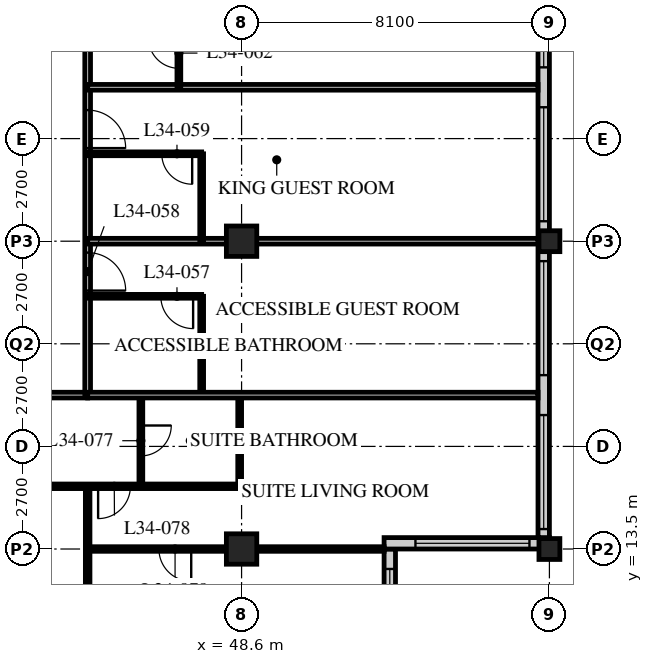
"""IFC4 building model, lengths in metres.
Left out: names, types, materials, properties, quantities, classifications, styles, units other than length and angle.
Written with IfcOpenShell. Run it as: python <this file> out.ifc"""

import sys

from ifc_helpers import new_model, si_unit, direction, frame, frame_2d, origin, origin_2d, place, context, subcontext, project, spatial, rectangle, hollow_rectangle, extrude, element, fill, save


model = new_model("IFC4")
c1 = context("Model", 3, precision=1e-05, world=origin(), true_north=direction((0.0, 1.0)))
c2 = subcontext(c1, "Body", "Model", "MODEL_VIEW")
j1 = project(units=[si_unit("LENGTHUNIT", "METRE"), si_unit("PLANEANGLEUNIT", "RADIAN")], contexts=[c1])
p1 = place(None, origin())
s1 = spatial("IfcSite", under=j1, at=p1, CompositionType="ELEMENT")
p2 = place(p1, origin())
s2 = spatial("IfcBuilding", under=s1, at=p2, CompositionType="ELEMENT")
p3 = place(p2, frame((0.0, 0.0, 134.0)))
s3 = spatial("IfcBuildingStorey", under=s2, at=p3, CompositionType="ELEMENT", Elevation=134.0)
for number, where, z_axis, x_axis in (
    (1, (48.6, 13.5, 0.0), (0.0, 0.0, 1.0), (1.0, 0.0, 0.0)),
    (2, (48.6, 21.6, 0.0), (0.0, 0.0, 1.0), (1.0, 0.0, 0.0)),
):
    element("IfcColumn", number, at=place(p3, frame(where, z_axis=z_axis, x_axis=x_axis)), inside=s3, PredefinedType="COLUMN", context=c2, shape_type="SweptSolid", body=[
        extrude(hollow_rectangle(XDim=0.8, YDim=0.8, WallThickness=0.08, at=origin_2d()), origin(), (0.0, 0.0, 1.0), 3.4),
    ])
for number, where, z_axis, x_axis in (
    (3, (56.7, 13.5, 0.0), (0.0, 0.0, 1.0), (1.0, 0.0, 0.0)),
    (4, (56.7, 21.6, 0.0), (0.0, 0.0, 1.0), (1.0, 0.0, 0.0)),
):
    element("IfcColumn", number, at=place(p3, frame(where, z_axis=z_axis, x_axis=x_axis)), inside=s3, PredefinedType="COLUMN", context=c2, shape_type="SweptSolid", body=[
        extrude(hollow_rectangle(XDim=0.55, YDim=0.55, WallThickness=0.04, at=origin_2d()), origin(), (0.0, 0.0, 1.0), 3.4),
    ])
p4 = place(p3, frame((52.5, 9.75, 0.0), z_axis=(0.0, 0.0, 1.0), x_axis=(0.0, 1.0, 0.0)))
e5 = element("IfcWall", 5, at=p4, inside=s3, PredefinedType="SOLIDWALL", context=c2, shape_type="SweptSolid", body=[
    extrude(rectangle(XDim=3.75, YDim=0.3, at=frame_2d((1.875, 0.0))), origin(), (0.0, 0.0, 1.0), 3.19),
])
p5 = place(p4, frame((0.225, 0.0, 0.9)))
e6 = element("IfcOpeningElement", 6, at=p5, cuts=e5, PredefinedType="OPENING", context=c2, shape_type="SweptSolid", body=[
    extrude(rectangle(XDim=3.0, YDim=1.5, at=frame_2d((1.5, 0.75))), frame((0.0, 0.16, 0.0), z_axis=(0.0, -1.0, 0.0), x_axis=(1.0, 0.0, 0.0)), (0.0, 0.0, 1.0), 0.32),
])
p6 = place(p3, frame((52.35, 13.65, 0.0), z_axis=(0.0, 0.0, 1.0), x_axis=(1.0, 0.0, 0.0)))
e7 = element("IfcWall", 7, at=p6, inside=s3, PredefinedType="SOLIDWALL", context=c2, shape_type="SweptSolid", body=[
    extrude(rectangle(XDim=4.35, YDim=0.3, at=frame_2d((2.175, 0.0))), origin(), (0.0, 0.0, 1.0), 3.19),
])
p7 = place(p6, frame((0.825, 0.0, 0.9)))
e8 = element("IfcOpeningElement", 8, at=p7, cuts=e7, PredefinedType="OPENING", context=c2, shape_type="SweptSolid", body=[
    extrude(rectangle(XDim=3.0, YDim=1.5, at=frame_2d((1.5, 0.75))), frame((0.0, 0.16, 0.0), z_axis=(0.0, -1.0, 0.0), x_axis=(1.0, 0.0, 0.0)), (0.0, 0.0, 1.0), 0.32),
])
p8 = place(p3, frame((56.55, 13.8, 0.0), z_axis=(0.0, 0.0, 1.0), x_axis=(0.0, 1.0, 0.0)))
e9 = element("IfcWall", 9, at=p8, inside=s3, PredefinedType="SOLIDWALL", context=c2, shape_type="SweptSolid", body=[
    extrude(rectangle(XDim=32.1, YDim=0.3, at=frame_2d((16.05, 0.0))), origin(), (0.0, 0.0, 1.0), 3.19),
])
p9 = place(p8, frame((0.225, 0.0, 0.9)))
e10 = element("IfcOpeningElement", 10, at=p9, cuts=e9, PredefinedType="OPENING", context=c2, shape_type="SweptSolid", body=[
    extrude(rectangle(XDim=3.0, YDim=2.0, at=frame_2d((1.5, 1.0))), frame((0.0, 0.16, 0.0), z_axis=(0.0, -1.0, 0.0), x_axis=(1.0, 0.0, 0.0)), (0.0, 0.0, 1.0), 0.32),
])
p10 = place(p8, frame((4.275, 0.0, 0.9)))
e11 = element("IfcOpeningElement", 11, at=p10, cuts=e9, PredefinedType="OPENING", context=c2, shape_type="SweptSolid", body=[
    extrude(rectangle(XDim=3.0, YDim=2.0, at=frame_2d((1.5, 1.0))), frame((0.0, 0.16, 0.0), z_axis=(0.0, -1.0, 0.0), x_axis=(1.0, 0.0, 0.0)), (0.0, 0.0, 1.0), 0.32),
])
p11 = place(p8, frame((8.325, 0.0, 0.9)))
e12 = element("IfcOpeningElement", 12, at=p11, cuts=e9, PredefinedType="OPENING", context=c2, shape_type="SweptSolid", body=[
    extrude(rectangle(XDim=3.0, YDim=2.0, at=frame_2d((1.5, 1.0))), frame((0.0, 0.16, 0.0), z_axis=(0.0, -1.0, 0.0), x_axis=(1.0, 0.0, 0.0)), (0.0, 0.0, 1.0), 0.32),
])
p12 = place(p8, frame((12.375, 0.0, 0.9)))
e13 = element("IfcOpeningElement", 13, at=p12, cuts=e9, PredefinedType="OPENING", context=c2, shape_type="SweptSolid", body=[
    extrude(rectangle(XDim=3.0, YDim=2.0, at=frame_2d((1.5, 1.0))), frame((0.0, 0.16, 0.0), z_axis=(0.0, -1.0, 0.0), x_axis=(1.0, 0.0, 0.0)), (0.0, 0.0, 1.0), 0.32),
])
p13 = place(p8, frame((16.425, 0.0, 0.9)))
e14 = element("IfcOpeningElement", 14, at=p13, cuts=e9, PredefinedType="OPENING", context=c2, shape_type="SweptSolid", body=[
    extrude(rectangle(XDim=3.0, YDim=2.0, at=frame_2d((1.5, 1.0))), frame((0.0, 0.16, 0.0), z_axis=(0.0, -1.0, 0.0), x_axis=(1.0, 0.0, 0.0)), (0.0, 0.0, 1.0), 0.32),
])
p14 = place(p8, frame((20.475, 0.0, 0.9)))
e15 = element("IfcOpeningElement", 15, at=p14, cuts=e9, PredefinedType="OPENING", context=c2, shape_type="SweptSolid", body=[
    extrude(rectangle(XDim=3.0, YDim=2.0, at=frame_2d((1.5, 1.0))), frame((0.0, 0.16, 0.0), z_axis=(0.0, -1.0, 0.0), x_axis=(1.0, 0.0, 0.0)), (0.0, 0.0, 1.0), 0.32),
])
p15 = place(p8, frame((24.525, 0.0, 0.9)))
e16 = element("IfcOpeningElement", 16, at=p15, cuts=e9, PredefinedType="OPENING", context=c2, shape_type="SweptSolid", body=[
    extrude(rectangle(XDim=3.0, YDim=2.0, at=frame_2d((1.5, 1.0))), frame((0.0, 0.16, 0.0), z_axis=(0.0, -1.0, 0.0), x_axis=(1.0, 0.0, 0.0)), (0.0, 0.0, 1.0), 0.32),
])
p16 = place(p8, frame((28.575, 0.0, 0.9)))
e17 = element("IfcOpeningElement", 17, at=p16, cuts=e9, PredefinedType="OPENING", context=c2, shape_type="SweptSolid", body=[
    extrude(rectangle(XDim=3.0, YDim=2.0, at=frame_2d((1.5, 1.0))), frame((0.0, 0.16, 0.0), z_axis=(0.0, -1.0, 0.0), x_axis=(1.0, 0.0, 0.0)), (0.0, 0.0, 1.0), 0.32),
])
p17 = place(p3, frame((8.1, 17.55, 0.0), z_axis=(0.0, 0.0, 1.0), x_axis=(1.0, 0.0, 0.0)))
e18 = element("IfcWall", 18, at=p17, inside=s3, PredefinedType="PARTITIONING", context=c2, shape_type="SweptSolid", body=[
    extrude(rectangle(XDim=36.45, YDim=0.15, at=frame_2d((18.225, 0.0))), origin(), (0.0, 0.0, 1.0), 3.19),
])
p18 = place(p17, frame((9.625, 0.0, 0.0)))
e19 = element("IfcOpeningElement", 19, at=p18, cuts=e18, PredefinedType="OPENING", context=c2, shape_type="SweptSolid", body=[
    extrude(rectangle(XDim=1.0, YDim=2.1, at=frame_2d((0.5, 1.05))), frame((0.0, 0.085, 0.0), z_axis=(0.0, -1.0, 0.0), x_axis=(1.0, 0.0, 0.0)), (0.0, 0.0, 1.0), 0.17),
])
p19 = place(p17, frame((18.1, 0.0, 0.0)))
e20 = element("IfcOpeningElement", 20, at=p19, cuts=e18, PredefinedType="OPENING", context=c2, shape_type="SweptSolid", body=[
    extrude(rectangle(XDim=1.0, YDim=2.1, at=frame_2d((0.5, 1.05))), frame((0.0, 0.085, 0.0), z_axis=(0.0, -1.0, 0.0), x_axis=(1.0, 0.0, 0.0)), (0.0, 0.0, 1.0), 0.17),
])
p20 = place(p17, frame((26.75, 0.0, 0.0)))
e21 = element("IfcOpeningElement", 21, at=p20, cuts=e18, PredefinedType="OPENING", context=c2, shape_type="SweptSolid", body=[
    extrude(rectangle(XDim=1.0, YDim=2.1, at=frame_2d((0.5, 1.05))), frame((0.0, 0.085, 0.0), z_axis=(0.0, -1.0, 0.0), x_axis=(1.0, 0.0, 0.0)), (0.0, 0.0, 1.0), 0.17),
])
p21 = place(p17, frame((30.8, 0.0, 0.0)))
e22 = element("IfcOpeningElement", 22, at=p21, cuts=e18, PredefinedType="OPENING", context=c2, shape_type="SweptSolid", body=[
    extrude(rectangle(XDim=1.0, YDim=2.1, at=frame_2d((0.5, 1.05))), frame((0.0, 0.085, 0.0), z_axis=(0.0, -1.0, 0.0), x_axis=(1.0, 0.0, 0.0)), (0.0, 0.0, 1.0), 0.17),
])
p22 = place(p17, frame((1.525, 0.0, 0.0)))
e23 = element("IfcOpeningElement", 23, at=p22, cuts=e18, PredefinedType="OPENING", context=c2, shape_type="SweptSolid", body=[
    extrude(rectangle(XDim=1.0, YDim=2.1, at=frame_2d((0.5, 1.05))), frame((0.0, 0.085, 0.0), z_axis=(0.0, -1.0, 0.0), x_axis=(1.0, 0.0, 0.0)), (0.0, 0.0, 1.0), 0.17),
])
p23 = place(p17, frame((33.925, 0.0, 0.0)))
e24 = element("IfcOpeningElement", 24, at=p23, cuts=e18, PredefinedType="OPENING", context=c2, shape_type="SweptSolid", body=[
    extrude(rectangle(XDim=1.0, YDim=2.1, at=frame_2d((0.5, 1.05))), frame((0.0, 0.085, 0.0), z_axis=(0.0, -1.0, 0.0), x_axis=(1.0, 0.0, 0.0)), (0.0, 0.0, 1.0), 0.17),
])
p24 = place(p3, frame((44.55, 17.55, 0.0), z_axis=(0.0, 0.0, 1.0), x_axis=(0.0, 1.0, 0.0)))
e25 = element("IfcWall", 25, at=p24, inside=s3, PredefinedType="PARTITIONING", context=c2, shape_type="SweptSolid", body=[
    extrude(rectangle(XDim=28.35, YDim=0.15, at=frame_2d((14.175, 0.0))), origin(), (0.0, 0.0, 1.0), 3.19),
])
p25 = place(p24, frame((2.75, 0.0, 0.0)))
e26 = element("IfcOpeningElement", 26, at=p25, cuts=e25, PredefinedType="OPENING", context=c2, shape_type="SweptSolid", body=[
    extrude(rectangle(XDim=1.0, YDim=2.1, at=frame_2d((0.5, 1.05))), frame((0.0, 0.085, 0.0), z_axis=(0.0, -1.0, 0.0), x_axis=(1.0, 0.0, 0.0)), (0.0, 0.0, 1.0), 0.17),
])
p26 = place(p24, frame((6.5, 0.0, 0.0)))
e27 = element("IfcOpeningElement", 27, at=p26, cuts=e25, PredefinedType="OPENING", context=c2, shape_type="SweptSolid", body=[
    extrude(rectangle(XDim=1.0, YDim=2.1, at=frame_2d((0.5, 1.05))), frame((0.0, 0.085, 0.0), z_axis=(0.0, -1.0, 0.0), x_axis=(1.0, 0.0, 0.0)), (0.0, 0.0, 1.0), 0.17),
])
p27 = place(p24, frame((13.55, 0.0, 0.0)))
e28 = element("IfcOpeningElement", 28, at=p27, cuts=e25, PredefinedType="OPENING", context=c2, shape_type="SweptSolid", body=[
    extrude(rectangle(XDim=1.0, YDim=2.1, at=frame_2d((0.5, 1.05))), frame((0.0, 0.085, 0.0), z_axis=(0.0, -1.0, 0.0), x_axis=(1.0, 0.0, 0.0)), (0.0, 0.0, 1.0), 0.17),
])
p28 = place(p24, frame((18.1, 0.0, 0.0)))
e29 = element("IfcOpeningElement", 29, at=p28, cuts=e25, PredefinedType="OPENING", context=c2, shape_type="SweptSolid", body=[
    extrude(rectangle(XDim=1.0, YDim=2.1, at=frame_2d((0.5, 1.05))), frame((0.0, 0.085, 0.0), z_axis=(0.0, -1.0, 0.0), x_axis=(1.0, 0.0, 0.0)), (0.0, 0.0, 1.0), 0.17),
])
p29 = place(p24, frame((26.75, 0.0, 0.0)))
e30 = element("IfcOpeningElement", 30, at=p29, cuts=e25, PredefinedType="OPENING", context=c2, shape_type="SweptSolid", body=[
    extrude(rectangle(XDim=1.0, YDim=2.1, at=frame_2d((0.5, 1.05))), frame((0.0, 0.085, 0.0), z_axis=(0.0, -1.0, 0.0), x_axis=(1.0, 0.0, 0.0)), (0.0, 0.0, 1.0), 0.17),
])
p30 = place(p3, frame((47.55, 17.55, 0.0), z_axis=(0.0, 0.0, 1.0), x_axis=(0.0, 1.0, 0.0)))
e31 = element("IfcWall", 31, at=p30, inside=s3, PredefinedType="PARTITIONING", context=c2, shape_type="SweptSolid", body=[
    extrude(rectangle(XDim=2.6, YDim=0.1, at=frame_2d((1.3, 0.0))), origin(), (0.0, 0.0, 1.0), 3.19),
])
p31 = place(p3, frame((44.55, 20.15, 0.0), z_axis=(0.0, 0.0, 1.0), x_axis=(1.0, 0.0, 0.0)))
e32 = element("IfcWall", 32, at=p31, inside=s3, PredefinedType="PARTITIONING", context=c2, shape_type="SweptSolid", body=[
    extrude(rectangle(XDim=3.0, YDim=0.1, at=frame_2d((1.5, 0.0))), origin(), (0.0, 0.0, 1.0), 3.19),
])
p32 = place(p31, frame((1.925, 0.0, 0.0)))
e33 = element("IfcOpeningElement", 33, at=p32, cuts=e32, PredefinedType="OPENING", context=c2, shape_type="SweptSolid", body=[
    extrude(rectangle(XDim=0.85, YDim=2.1, at=frame_2d((0.425, 1.05))), frame((0.0, 0.06, 0.0), z_axis=(0.0, -1.0, 0.0), x_axis=(1.0, 0.0, 0.0)), (0.0, 0.0, 1.0), 0.12),
])
p33 = place(p3, frame((44.55, 21.6, 0.0), z_axis=(0.0, 0.0, 1.0), x_axis=(1.0, 0.0, 0.0)))
e34 = element("IfcWall", 34, at=p33, inside=s3, PredefinedType="PARTITIONING", context=c2, shape_type="SweptSolid", body=[
    extrude(rectangle(XDim=11.85, YDim=0.15, at=frame_2d((5.925, 0.0))), origin(), (0.0, 0.0, 1.0), 2.578),
])
p34 = place(p3, frame((47.55, 21.6, 0.0), z_axis=(0.0, 0.0, 1.0), x_axis=(0.0, 1.0, 0.0)))
e35 = element("IfcWall", 35, at=p34, inside=s3, PredefinedType="PARTITIONING", context=c2, shape_type="SweptSolid", body=[
    extrude(rectangle(XDim=2.3, YDim=0.1, at=frame_2d((1.15, 0.0))), origin(), (0.0, 0.0, 1.0), 3.19),
])
p35 = place(p3, frame((44.55, 23.9, 0.0), z_axis=(0.0, 0.0, 1.0), x_axis=(1.0, 0.0, 0.0)))
e36 = element("IfcWall", 36, at=p35, inside=s3, PredefinedType="PARTITIONING", context=c2, shape_type="SweptSolid", body=[
    extrude(rectangle(XDim=3.0, YDim=0.1, at=frame_2d((1.5, 0.0))), origin(), (0.0, 0.0, 1.0), 3.19),
])
p36 = place(p35, frame((1.95, 0.0, 0.0)))
e37 = element("IfcOpeningElement", 37, at=p36, cuts=e36, PredefinedType="OPENING", context=c2, shape_type="SweptSolid", body=[
    extrude(rectangle(XDim=0.8, YDim=2.1, at=frame_2d((0.4, 1.05))), frame((0.0, 0.06, 0.0), z_axis=(0.0, -1.0, 0.0), x_axis=(1.0, 0.0, 0.0)), (0.0, 0.0, 1.0), 0.12),
])
p37 = place(p3, frame((44.55, 25.65, 0.0), z_axis=(0.0, 0.0, 1.0), x_axis=(1.0, 0.0, 0.0)))
e38 = element("IfcWall", 38, at=p37, inside=s3, PredefinedType="PARTITIONING", context=c2, shape_type="SweptSolid", body=[
    extrude(rectangle(XDim=11.85, YDim=0.15, at=frame_2d((5.925, 0.0))), origin(), (0.0, 0.0, 1.0), 3.19),
])
p38 = place(p3, frame((46.95, 25.65, 0.0), z_axis=(0.0, 0.0, 1.0), x_axis=(0.0, 1.0, 0.0)))
e39 = element("IfcWall", 39, at=p38, inside=s3, PredefinedType="PARTITIONING", context=c2, shape_type="SweptSolid", body=[
    extrude(rectangle(XDim=1.8, YDim=0.1, at=frame_2d((0.9, 0.0))), origin(), (0.0, 0.0, 1.0), 3.19),
])
p39 = place(p38, frame((0.5, 0.0, 0.0)))
e40 = element("IfcOpeningElement", 40, at=p39, cuts=e39, PredefinedType="OPENING", context=c2, shape_type="SweptSolid", body=[
    extrude(rectangle(XDim=0.8, YDim=2.1, at=frame_2d((0.4, 1.05))), frame((0.0, 0.06, 0.0), z_axis=(0.0, -1.0, 0.0), x_axis=(1.0, 0.0, 0.0)), (0.0, 0.0, 1.0), 0.12),
])
p40 = place(p3, frame((40.5, 15.15, 0.0), z_axis=(0.0, 0.0, 1.0), x_axis=(1.0, 0.0, 0.0)))
e41 = element("IfcWall", 41, at=p40, inside=s3, PredefinedType="PARTITIONING", context=c2, shape_type="SweptSolid", body=[
    extrude(rectangle(XDim=8.05, YDim=0.12, at=frame_2d((4.025, 0.0))), origin(), (0.0, 0.0, 1.0), 3.19),
])
p41 = place(p40, frame((0.475, 0.0, 0.0)))
e42 = element("IfcOpeningElement", 42, at=p41, cuts=e41, PredefinedType="OPENING", context=c2, shape_type="SweptSolid", body=[
    extrude(rectangle(XDim=0.85, YDim=2.1, at=frame_2d((0.425, 1.05))), frame((0.0, 0.07, 0.0), z_axis=(0.0, -1.0, 0.0), x_axis=(1.0, 0.0, 0.0)), (0.0, 0.0, 1.0), 0.14),
])
p42 = place(p40, frame((4.325, 0.0, 0.0)))
e43 = element("IfcOpeningElement", 43, at=p42, cuts=e41, PredefinedType="OPENING", context=c2, shape_type="SweptSolid", body=[
    extrude(rectangle(XDim=0.85, YDim=2.1, at=frame_2d((0.425, 1.05))), frame((0.0, 0.07, 0.0), z_axis=(0.0, -1.0, 0.0), x_axis=(1.0, 0.0, 0.0)), (0.0, 0.0, 1.0), 0.14),
])
p43 = place(p3, frame((45.95, 17.55, 0.0), z_axis=(0.0, 0.0, 1.0), x_axis=(0.0, -1.0, 0.0)))
e44 = element("IfcWall", 44, at=p43, inside=s3, PredefinedType="PARTITIONING", context=c2, shape_type="SweptSolid", body=[
    extrude(rectangle(XDim=2.4, YDim=0.1, at=frame_2d((1.2, 0.0))), origin(), (0.0, 0.0, 1.0), 3.19),
])
p44 = place(p43, frame((0.8, 0.0, 0.0)))
e45 = element("IfcOpeningElement", 45, at=p44, cuts=e44, PredefinedType="OPENING", context=c2, shape_type="SweptSolid", body=[
    extrude(rectangle(XDim=0.8, YDim=2.1, at=frame_2d((0.4, 1.05))), frame((0.0, 0.06, 0.0), z_axis=(0.0, -1.0, 0.0), x_axis=(1.0, 0.0, 0.0)), (0.0, 0.0, 1.0), 0.12),
])
p45 = place(p3, frame((48.55, 17.55, 0.0), z_axis=(0.0, 0.0, 1.0), x_axis=(0.0, -1.0, 0.0)))
e46 = element("IfcWall", 46, at=p45, inside=s3, PredefinedType="PARTITIONING", context=c2, shape_type="SweptSolid", body=[
    extrude(rectangle(XDim=2.4, YDim=0.1, at=frame_2d((1.2, 0.0))), origin(), (0.0, 0.0, 1.0), 2.578),
])
p46 = place(p3, frame((44.55, 15.15, 0.0), z_axis=(0.0, 0.0, 1.0), x_axis=(0.0, -1.0, 0.0)))
e47 = element("IfcWall", 47, at=p46, inside=s3, PredefinedType="PARTITIONING", context=c2, shape_type="SweptSolid", body=[
    extrude(rectangle(XDim=9.45, YDim=0.12, at=frame_2d((4.725, 0.0))), origin(), (0.0, 0.0, 1.0), 3.19),
])
p47 = place(p3, frame((44.55, 13.5, 0.0), z_axis=(0.0, 0.0, 1.0), x_axis=(1.0, 0.0, 0.0)))
e48 = element("IfcWall", 48, at=p47, inside=s3, PredefinedType="PARTITIONING", context=c2, shape_type="SweptSolid", body=[
    extrude(rectangle(XDim=7.8, YDim=0.12, at=frame_2d((3.9, 0.0))), origin(), (0.0, 0.0, 1.0), 2.578),
])
p48 = place(p47, frame((1.875, 0.0, 0.0)))
e49 = element("IfcOpeningElement", 49, at=p48, cuts=e48, PredefinedType="OPENING", context=c2, shape_type="SweptSolid", body=[
    extrude(rectangle(XDim=0.85, YDim=2.1, at=frame_2d((0.425, 1.05))), frame((0.0, 0.07, 0.0), z_axis=(0.0, -1.0, 0.0), x_axis=(1.0, 0.0, 0.0)), (0.0, 0.0, 1.0), 0.14),
])
p49 = place(p3, frame((44.55, 17.55, 0.0), z_axis=(0.0, 0.0, 1.0), x_axis=(1.0, 0.0, 0.0)))
e50 = element("IfcWall", 50, at=p49, inside=s3, PredefinedType="PARTITIONING", context=c2, shape_type="SweptSolid", body=[
    extrude(rectangle(XDim=11.85, YDim=0.15, at=frame_2d((5.925, 0.0))), origin(), (0.0, 0.0, 1.0), 3.19),
])
p50 = place(p5, origin())
e51 = element("IfcWindow", 51, at=p50, inside=s3, PartitioningType="SINGLE_PANEL", PredefinedType="WINDOW", context=c2, shape_type="SweptSolid", body=[
    extrude(rectangle(XDim=3.0, YDim=1.5, at=frame_2d((1.5, 0.75))), frame((0.0, 0.03, 0.0), z_axis=(0.0, -1.0, 0.0), x_axis=(1.0, 0.0, 0.0)), (0.0, 0.0, 1.0), 0.06),
])
fill(e6, e51)
p51 = place(p7, origin())
e52 = element("IfcWindow", 52, at=p51, inside=s3, PartitioningType="SINGLE_PANEL", PredefinedType="WINDOW", context=c2, shape_type="SweptSolid", body=[
    extrude(rectangle(XDim=3.0, YDim=1.5, at=frame_2d((1.5, 0.75))), frame((0.0, 0.03, 0.0), z_axis=(0.0, -1.0, 0.0), x_axis=(1.0, 0.0, 0.0)), (0.0, 0.0, 1.0), 0.06),
])
fill(e8, e52)
p52 = place(p9, origin())
e53 = element("IfcWindow", 53, at=p52, inside=s3, PartitioningType="SINGLE_PANEL", PredefinedType="WINDOW", context=c2, shape_type="SweptSolid", body=[
    extrude(rectangle(XDim=3.0, YDim=2.0, at=frame_2d((1.5, 1.0))), frame((0.0, 0.03, 0.0), z_axis=(0.0, -1.0, 0.0), x_axis=(1.0, 0.0, 0.0)), (0.0, 0.0, 1.0), 0.06),
])
fill(e10, e53)
p53 = place(p10, origin())
e54 = element("IfcWindow", 54, at=p53, inside=s3, PartitioningType="SINGLE_PANEL", PredefinedType="WINDOW", context=c2, shape_type="SweptSolid", body=[
    extrude(rectangle(XDim=3.0, YDim=2.0, at=frame_2d((1.5, 1.0))), frame((0.0, 0.03, 0.0), z_axis=(0.0, -1.0, 0.0), x_axis=(1.0, 0.0, 0.0)), (0.0, 0.0, 1.0), 0.06),
])
fill(e11, e54)
p54 = place(p11, origin())
e55 = element("IfcWindow", 55, at=p54, inside=s3, PartitioningType="SINGLE_PANEL", PredefinedType="WINDOW", context=c2, shape_type="SweptSolid", body=[
    extrude(rectangle(XDim=3.0, YDim=2.0, at=frame_2d((1.5, 1.0))), frame((0.0, 0.03, 0.0), z_axis=(0.0, -1.0, 0.0), x_axis=(1.0, 0.0, 0.0)), (0.0, 0.0, 1.0), 0.06),
])
fill(e12, e55)
p55 = place(p12, origin())
e56 = element("IfcWindow", 56, at=p55, inside=s3, PartitioningType="SINGLE_PANEL", PredefinedType="WINDOW", context=c2, shape_type="SweptSolid", body=[
    extrude(rectangle(XDim=3.0, YDim=2.0, at=frame_2d((1.5, 1.0))), frame((0.0, 0.03, 0.0), z_axis=(0.0, -1.0, 0.0), x_axis=(1.0, 0.0, 0.0)), (0.0, 0.0, 1.0), 0.06),
])
fill(e13, e56)
p56 = place(p32, origin())
e57 = element("IfcDoor", 57, at=p56, inside=s3, OperationType="SINGLE_SWING_LEFT", PredefinedType="DOOR", context=c2, shape_type="SweptSolid", body=[
    extrude(rectangle(XDim=0.85, YDim=2.1, at=frame_2d((0.425, 1.05))), frame((0.0, 0.025, 0.0), z_axis=(0.0, -1.0, 0.0), x_axis=(1.0, 0.0, 0.0)), (0.0, 0.0, 1.0), 0.05),
])
fill(e33, e57)
p57 = place(p25, origin())
e58 = element("IfcDoor", 58, at=p57, inside=s3, OperationType="SINGLE_SWING_RIGHT", PredefinedType="DOOR", context=c2, shape_type="SweptSolid", body=[
    extrude(rectangle(XDim=1.0, YDim=2.1, at=frame_2d((0.5, 1.05))), frame((0.0, 0.025, 0.0), z_axis=(0.0, -1.0, 0.0), x_axis=(1.0, 0.0, 0.0)), (0.0, 0.0, 1.0), 0.05),
])
fill(e26, e58)
p58 = place(p36, origin())
e59 = element("IfcDoor", 59, at=p58, inside=s3, OperationType="SINGLE_SWING_LEFT", PredefinedType="DOOR", context=c2, shape_type="SweptSolid", body=[
    extrude(rectangle(XDim=0.8, YDim=2.1, at=frame_2d((0.4, 1.05))), frame((0.0, 0.025, 0.0), z_axis=(0.0, -1.0, 0.0), x_axis=(1.0, 0.0, 0.0)), (0.0, 0.0, 1.0), 0.05),
])
fill(e37, e59)
p59 = place(p26, origin())
e60 = element("IfcDoor", 60, at=p59, inside=s3, OperationType="SINGLE_SWING_RIGHT", PredefinedType="DOOR", context=c2, shape_type="SweptSolid", body=[
    extrude(rectangle(XDim=1.0, YDim=2.1, at=frame_2d((0.5, 1.05))), frame((0.0, 0.025, 0.0), z_axis=(0.0, -1.0, 0.0), x_axis=(1.0, 0.0, 0.0)), (0.0, 0.0, 1.0), 0.05),
])
fill(e27, e60)
p60 = place(p39, origin())
e61 = element("IfcDoor", 61, at=p60, inside=s3, OperationType="SINGLE_SWING_RIGHT", PredefinedType="DOOR", context=c2, shape_type="SweptSolid", body=[
    extrude(rectangle(XDim=0.8, YDim=2.1, at=frame_2d((0.4, 1.05))), frame((0.0, 0.025, 0.0), z_axis=(0.0, -1.0, 0.0), x_axis=(1.0, 0.0, 0.0)), (0.0, 0.0, 1.0), 0.05),
])
fill(e40, e61)
p61 = place(p44, origin())
e62 = element("IfcDoor", 62, at=p61, inside=s3, OperationType="SINGLE_SWING_LEFT", PredefinedType="DOOR", context=c2, shape_type="SweptSolid", body=[
    extrude(rectangle(XDim=0.8, YDim=2.1, at=frame_2d((0.4, 1.05))), frame((0.0, 0.025, 0.0), z_axis=(0.0, -1.0, 0.0), x_axis=(1.0, 0.0, 0.0)), (0.0, 0.0, 1.0), 0.05),
])
fill(e45, e62)
p62 = place(p42, origin())
e63 = element("IfcDoor", 63, at=p62, inside=s3, OperationType="SINGLE_SWING_RIGHT", PredefinedType="DOOR", context=c2, shape_type="SweptSolid", body=[
    extrude(rectangle(XDim=0.85, YDim=2.1, at=frame_2d((0.425, 1.05))), frame((0.0, 0.025, 0.0), z_axis=(0.0, -1.0, 0.0), x_axis=(1.0, 0.0, 0.0)), (0.0, 0.0, 1.0), 0.05),
])
fill(e43, e63)
p63 = place(p48, origin())
e64 = element("IfcDoor", 64, at=p63, inside=s3, OperationType="SINGLE_SWING_LEFT", PredefinedType="DOOR", context=c2, shape_type="SweptSolid", body=[
    extrude(rectangle(XDim=0.85, YDim=2.1, at=frame_2d((0.425, 1.05))), frame((0.0, 0.025, 0.0), z_axis=(0.0, -1.0, 0.0), x_axis=(1.0, 0.0, 0.0)), (0.0, 0.0, 1.0), 0.05),
])
fill(e49, e64)
save(model, sys.argv[1])
